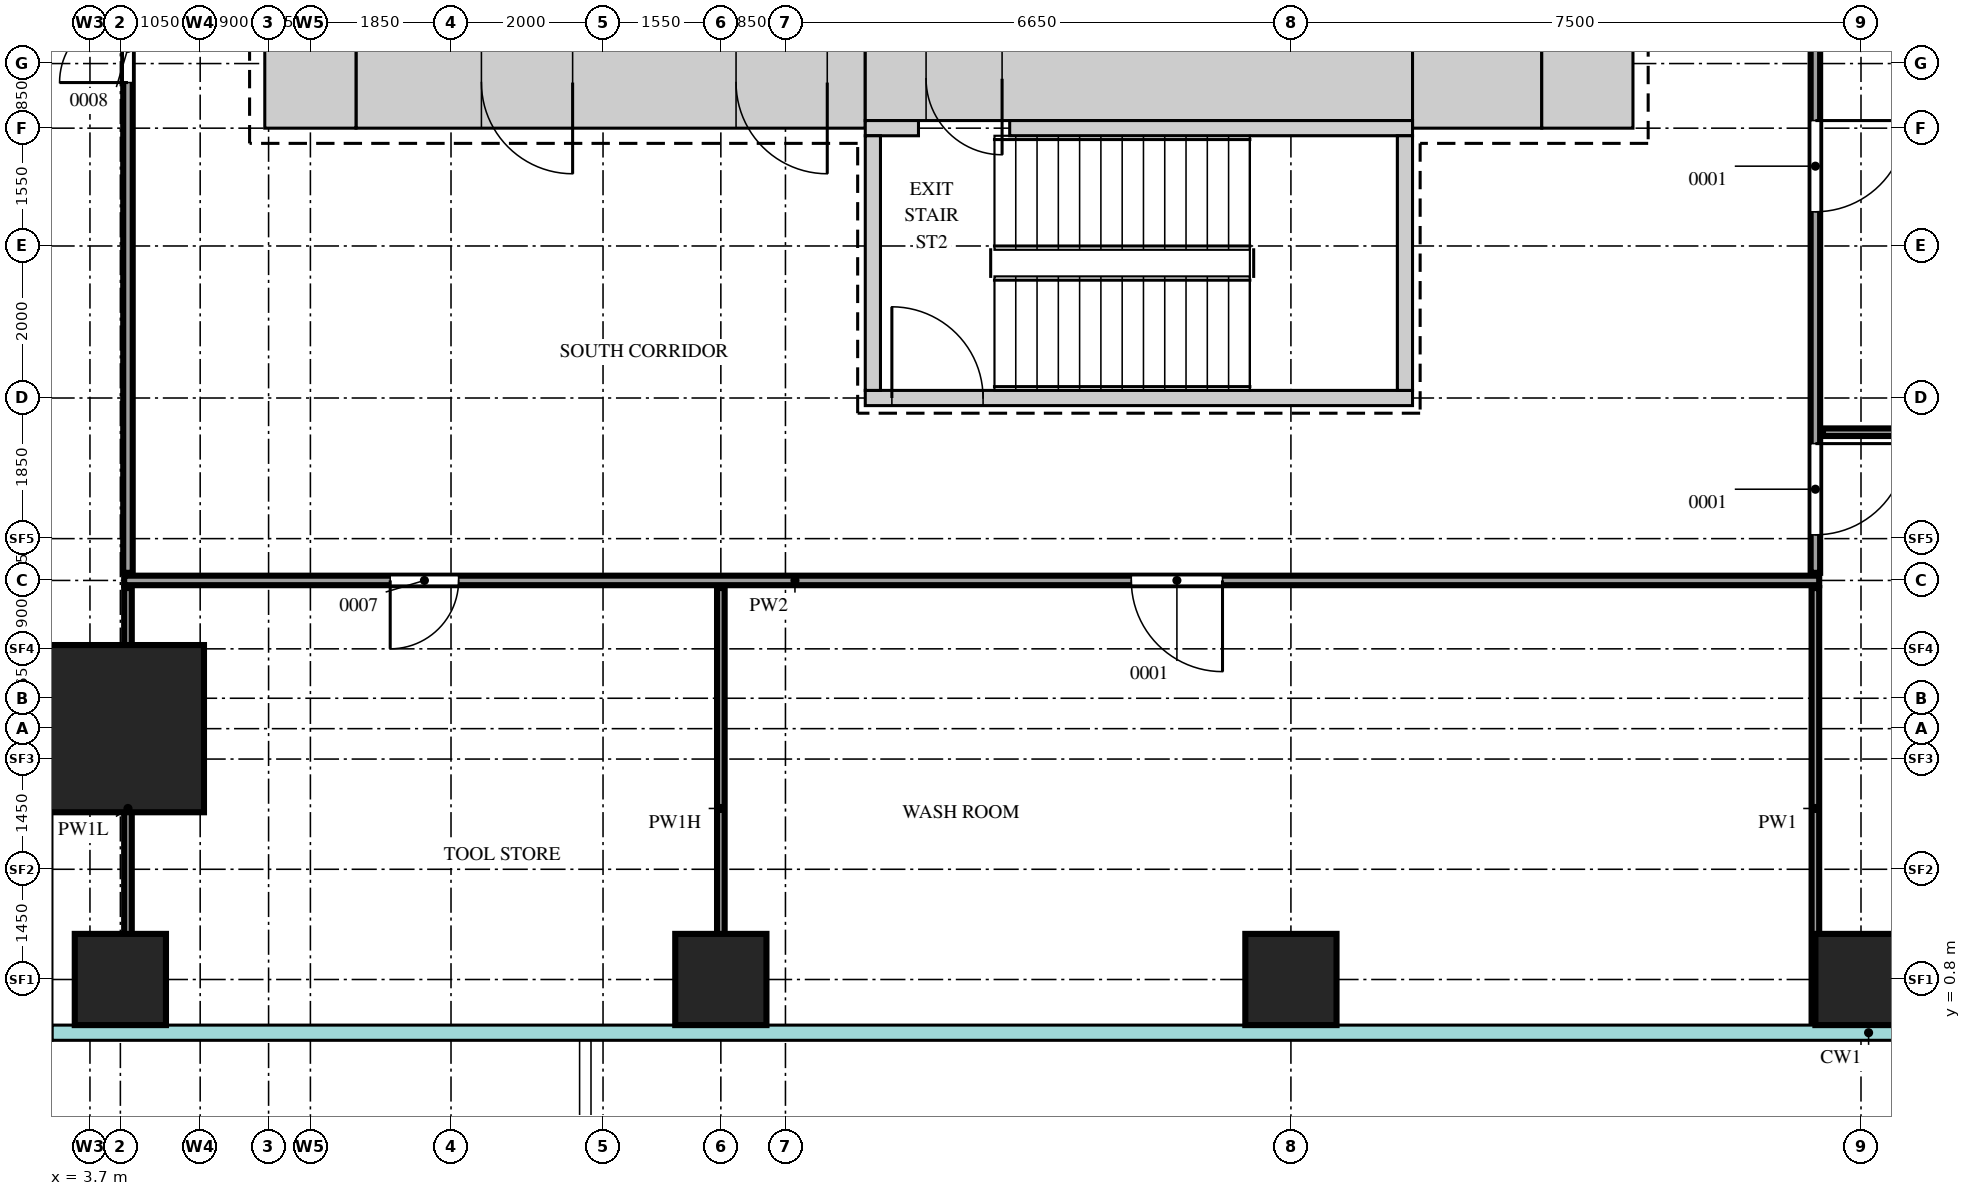
"""IFC4 building model, lengths in metres.
Left out: names, types, materials, properties, quantities, classifications, styles, units other than length and angle.
Written with IfcOpenShell. Run it as: python <this file> out.ifc"""

import sys

from ifc_helpers import new_model, si_unit, direction, frame, frame_2d, origin, origin_2d, place, context, subcontext, project, spatial, rectangle, extrude, source, transform, mapped, element, fill, save


model = new_model("IFC4")
c1 = context("Model", 3, precision=1e-05, world=origin(), true_north=direction((0.0, 1.0)))
c2 = subcontext(c1, "Body", "Model", "MODEL_VIEW")
j1 = project(units=[si_unit("LENGTHUNIT", "METRE"), si_unit("PLANEANGLEUNIT", "RADIAN")], contexts=[c1])
p1 = place(None, origin())
s1 = spatial("IfcSite", under=j1, at=p1, CompositionType="ELEMENT")
p2 = place(p1, origin())
s2 = spatial("IfcBuilding", under=s1, at=p2, CompositionType="ELEMENT")
p3 = place(p2, frame((0.0, 0.0, 64.5)))
s3 = spatial("IfcBuildingStorey", under=s2, at=p3, CompositionType="ELEMENT", Elevation=64.5)
m1 = source(origin(), c2, "Body", "SweptSolid", [
    extrude(rectangle(XDim=6.7, YDim=1.2, at=frame_2d((3.35, 0.0))), origin(), (0.0, 0.0, 1.0), 4.2),
])
p4 = place(p3, frame((7.2, 12.6, 0.0), z_axis=(0.0, 0.0, 1.0), x_axis=(1.0, 0.0, 0.0)))
e1 = element("IfcWall", 1, at=p4, inside=s3, PredefinedType="SHEAR", context=c2, shape_type="MappedRepresentation", body=[
    mapped(m1, transform((0.0, 0.0, 0.0))),
])
m2 = source(origin(), c2, "Body", "SweptSolid", [
    extrude(rectangle(XDim=1.2, YDim=2.1, at=frame_2d((0.6, 1.05))), frame((0.0, 0.61, 0.0), z_axis=(0.0, -1.0, 0.0), x_axis=(1.0, 0.0, 0.0)), (0.0, 0.0, 1.0), 1.22),
])
p5 = place(p4, frame((5.0, 0.0, 0.0)))
e2 = element("IfcOpeningElement", 2, at=p5, cuts=e1, PredefinedType="OPENING", context=c2, shape_type="MappedRepresentation", body=[
    mapped(m2, transform((0.0, 0.0, 0.0))),
])
p6 = place(p4, frame((1.65, 0.0, 0.0)))
e3 = element("IfcOpeningElement", 3, at=p6, cuts=e1, PredefinedType="OPENING", context=c2, shape_type="MappedRepresentation", body=[
    mapped(m2, transform((0.0, 0.0, 0.0))),
])
m3 = source(origin(), c2, "Body", "SweptSolid", [
    extrude(rectangle(XDim=7.2, YDim=1.1, at=frame_2d((3.6, 0.0))), origin(), (0.0, 0.0, 1.0), 4.2),
])
p7 = place(p3, frame((13.9, 12.65, 0.0), z_axis=(0.0, 0.0, 1.0), x_axis=(1.0, 0.0, 0.0)))
e4 = element("IfcWall", 4, at=p7, inside=s3, PredefinedType="SHEAR", context=c2, shape_type="MappedRepresentation", body=[
    mapped(m3, transform((0.0, 0.0, 0.0))),
])
m4 = source(origin(), c2, "Body", "SweptSolid", [
    extrude(rectangle(XDim=1.0, YDim=2.1, at=frame_2d((0.5, 1.05))), frame((0.0, 0.56, 0.0), z_axis=(0.0, -1.0, 0.0), x_axis=(1.0, 0.0, 0.0)), (0.0, 0.0, 1.0), 1.12),
])
p8 = place(p7, frame((0.8, 0.0, 0.0)))
e5 = element("IfcOpeningElement", 5, at=p8, cuts=e4, PredefinedType="OPENING", context=c2, shape_type="MappedRepresentation", body=[
    mapped(m4, transform((0.0, 0.0, 0.0))),
])
m5 = source(origin(), c2, "Body", "SweptSolid", [
    extrude(rectangle(XDim=1.7, YDim=1.2, at=frame_2d((0.85, 0.0))), origin(), (0.0, 0.0, 1.0), 4.2),
])
p9 = place(p3, frame((21.1, 12.6, 0.0), z_axis=(0.0, 0.0, 1.0), x_axis=(1.0, 0.0, 0.0)))
e6 = element("IfcWall", 6, at=p9, inside=s3, PredefinedType="SHEAR", context=c2, shape_type="MappedRepresentation", body=[
    mapped(m5, transform((0.0, 0.0, 0.0))),
])
m6 = source(origin(), c2, "Body", "SweptSolid", [
    extrude(rectangle(XDim=1.2, YDim=1.2, at=frame_2d((0.6, 0.0))), origin(), (0.0, 0.0, 1.0), 4.2),
])
for number, where, z_axis, x_axis in (
    (7, (22.8, 12.6, 0.0), (0.0, 0.0, 1.0), (1.0, 0.0, 0.0)),
    (8, (6.0, 12.6, 0.0), (0.0, 0.0, 1.0), (1.0, 0.0, 0.0)),
):
    element("IfcWall", number, at=place(p3, frame(where, z_axis=z_axis, x_axis=x_axis)), inside=s3, PredefinedType="SHEAR", context=c2, shape_type="MappedRepresentation", body=[
        mapped(m6, transform((0.0, 0.0, 0.0))),
    ])
m7 = source(origin(), c2, "Body", "SweptSolid", [
    extrude(rectangle(XDim=0.7, YDim=0.2, at=frame_2d((0.35, 0.0))), origin(), (0.0, 0.0, 1.0), 4.2),
])
p10 = place(p3, frame((13.9, 12.0, 0.0), z_axis=(0.0, 0.0, 1.0), x_axis=(1.0, 0.0, 0.0)))
e9 = element("IfcWall", 9, at=p10, inside=s3, PredefinedType="SHEAR", context=c2, shape_type="MappedRepresentation", body=[
    mapped(m7, transform((0.0, 0.0, 0.0))),
])
m8 = source(origin(), c2, "Body", "SweptSolid", [
    extrude(rectangle(XDim=5.3, YDim=0.2, at=frame_2d((2.65, 0.0))), origin(), (0.0, 0.0, 1.0), 4.2),
])
p11 = place(p3, frame((15.8, 12.0, 0.0), z_axis=(0.0, 0.0, 1.0), x_axis=(1.0, 0.0, 0.0)))
e10 = element("IfcWall", 10, at=p11, inside=s3, PredefinedType="SHEAR", context=c2, shape_type="MappedRepresentation", body=[
    mapped(m8, transform((0.0, 0.0, 0.0))),
])
m9 = source(origin(), c2, "Body", "SweptSolid", [
    extrude(rectangle(XDim=7.2, YDim=0.2, at=frame_2d((3.6, 0.0))), origin(), (0.0, 0.0, 1.0), 4.2),
])
p12 = place(p3, frame((13.9, 8.45, 0.0), z_axis=(0.0, 0.0, 1.0), x_axis=(1.0, 0.0, 0.0)))
e11 = element("IfcWall", 11, at=p12, inside=s3, PredefinedType="SHEAR", context=c2, shape_type="MappedRepresentation", body=[
    mapped(m9, transform((0.0, 0.0, 0.0))),
])
m10 = source(origin(), c2, "Body", "SweptSolid", [
    extrude(rectangle(XDim=1.2, YDim=2.1, at=frame_2d((0.6, 1.05))), frame((0.0, 0.11, 0.0), z_axis=(0.0, -1.0, 0.0), x_axis=(1.0, 0.0, 0.0)), (0.0, 0.0, 1.0), 0.22),
])
p13 = place(p12, frame((0.35, 0.0, 0.0)))
e12 = element("IfcOpeningElement", 12, at=p13, cuts=e11, PredefinedType="OPENING", context=c2, shape_type="MappedRepresentation", body=[
    mapped(m10, transform((0.0, 0.0, 0.0))),
])
m11 = source(origin(), c2, "Body", "SweptSolid", [
    extrude(rectangle(XDim=3.35, YDim=0.2, at=frame_2d((1.675, 0.0))), origin(), (0.0, 0.0, 1.0), 4.2),
])
for number, where, z_axis, x_axis in (
    (13, (21.0, 8.55, 0.0), (0.0, 0.0, 1.0), (0.0, 1.0, 0.0)),
    (14, (14.0, 8.55, 0.0), (0.0, 0.0, 1.0), (0.0, 1.0, 0.0)),
):
    element("IfcWall", number, at=place(p3, frame(where, z_axis=z_axis, x_axis=x_axis)), inside=s3, PredefinedType="SHEAR", context=c2, shape_type="MappedRepresentation", body=[
        mapped(m11, transform((0.0, 0.0, 0.0))),
    ])
m12 = source(origin(), c2, "Body", "SweptSolid", [
    extrude(rectangle(XDim=2.2, YDim=2.2, at=origin_2d()), origin(), (0.0, 0.0, 1.0), 4.5),
])
p14 = place(p3, frame((4.1, 4.1, 0.0), z_axis=(0.0, 0.0, 1.0), x_axis=(1.0, 0.0, 0.0)))
e15 = element("IfcColumn", 15, at=p14, inside=s3, PredefinedType="COLUMN", context=c2, shape_type="MappedRepresentation", body=[
    mapped(m12, transform((0.0, 0.0, 0.0))),
])
m13 = source(origin(), c2, "Body", "SweptSolid", [
    extrude(rectangle(XDim=1.2, YDim=1.2, at=origin_2d()), origin(), (0.0, 0.0, 1.0), 4.2),
])
for number, where, z_axis, x_axis in (
    (16, (4.1, 0.8, 0.0), (0.0, 0.0, 1.0), (1.0, 0.0, 0.0)),
    (17, (12.0, 0.8, 0.0), (0.0, 0.0, 1.0), (1.0, 0.0, 0.0)),
    (18, (19.5, 0.8, 0.0), (0.0, 0.0, 1.0), (1.0, 0.0, 0.0)),
    (19, (27.0, 0.8, 0.0), (0.0, 0.0, 1.0), (1.0, 0.0, 0.0)),
):
    element("IfcColumn", number, at=place(p3, frame(where, z_axis=z_axis, x_axis=x_axis)), inside=s3, PredefinedType="COLUMN", context=c2, shape_type="MappedRepresentation", body=[
        mapped(m13, transform((0.0, 0.0, 0.0))),
    ])
m14 = source(origin(), c2, "Body", "SweptSolid", [
    extrude(rectangle(XDim=5.8, YDim=0.1, at=frame_2d((2.9, 0.0))), origin(), (0.0, 0.0, 1.0), 3.6),
])
p15 = place(p3, frame((4.2, 0.15, 0.0), z_axis=(0.0, 0.0, 1.0), x_axis=(0.0, 1.0, 0.0)))
e20 = element("IfcWall", 20, at=p15, inside=s3, PredefinedType="PARTITIONING", context=c2, shape_type="MappedRepresentation", body=[
    mapped(m14, transform((0.0, 0.0, 0.0))),
])
m15 = source(origin(), c2, "Body", "SweptSolid", [
    extrude(rectangle(XDim=5.8, YDim=0.1, at=frame_2d((2.9, 0.0))), origin(), (0.0, 0.0, 1.0), 3.7),
])
p16 = place(p3, frame((12.0, 0.15, 0.0), z_axis=(0.0, 0.0, 1.0), x_axis=(0.0, 1.0, 0.0)))
e21 = element("IfcWall", 21, at=p16, inside=s3, PredefinedType="PARTITIONING", context=c2, shape_type="MappedRepresentation", body=[
    mapped(m15, transform((0.0, 0.0, 0.0))),
])
m16 = source(origin(), c2, "Body", "SweptSolid", [
    extrude(rectangle(XDim=5.8, YDim=0.1, at=frame_2d((2.9, 0.0))), origin(), (0.0, 0.0, 1.0), 4.3),
])
p17 = place(p3, frame((26.4, 0.15, 0.0), z_axis=(0.0, 0.0, 1.0), x_axis=(0.0, 1.0, 0.0)))
e22 = element("IfcWall", 22, at=p17, inside=s3, PredefinedType="PARTITIONING", context=c2, shape_type="MappedRepresentation", body=[
    mapped(m16, transform((0.0, 0.0, 0.0))),
])
m17 = source(origin(), c2, "Body", "SweptSolid", [
    extrude(rectangle(XDim=22.3, YDim=0.125, at=frame_2d((11.15, 0.0))), origin(), (0.0, 0.0, 1.0), 4.3),
])
p18 = place(p3, frame((4.15, 6.05, 0.0), z_axis=(0.0, 0.0, 1.0), x_axis=(1.0, 0.0, 0.0)))
e23 = element("IfcWall", 23, at=p18, inside=s3, PredefinedType="PARTITIONING", context=c2, shape_type="MappedRepresentation", body=[
    mapped(m17, transform((0.0, 0.0, 0.0))),
])
m18 = source(origin(), c2, "Body", "SweptSolid", [
    extrude(rectangle(XDim=0.9, YDim=2.1, at=frame_2d((0.45, 1.05))), frame((0.0, 0.073, 0.0), z_axis=(0.0, -1.0, 0.0), x_axis=(1.0, 0.0, 0.0)), (0.0, 0.0, 1.0), 0.145),
])
p19 = place(p18, frame((3.5, 0.0, 0.0)))
e24 = element("IfcOpeningElement", 24, at=p19, cuts=e23, PredefinedType="OPENING", context=c2, shape_type="MappedRepresentation", body=[
    mapped(m18, transform((0.0, 0.0, 0.0))),
])
m19 = source(origin(), c2, "Body", "SweptSolid", [
    extrude(rectangle(XDim=1.2, YDim=2.1, at=frame_2d((0.6, 1.05))), frame((0.0, 0.073, 0.0), z_axis=(0.0, -1.0, 0.0), x_axis=(1.0, 0.0, 0.0)), (0.0, 0.0, 1.0), 0.145),
])
p20 = place(p18, frame((13.25, 0.0, 0.0)))
e25 = element("IfcOpeningElement", 25, at=p20, cuts=e23, PredefinedType="OPENING", context=c2, shape_type="MappedRepresentation", body=[
    mapped(m19, transform((0.0, 0.0, 0.0))),
])
m20 = source(origin(), c2, "Body", "SweptSolid", [
    extrude(rectangle(XDim=41.8, YDim=0.125, at=frame_2d((20.9, 0.0))), origin(), (0.0, 0.0, 1.0), 4.3),
])
p21 = place(p3, frame((4.2, 6.15, 0.0), z_axis=(0.0, 0.0, 1.0), x_axis=(0.0, 1.0, 0.0)))
e26 = element("IfcWall", 26, at=p21, inside=s3, PredefinedType="PARTITIONING", context=c2, shape_type="MappedRepresentation", body=[
    mapped(m20, transform((0.0, 0.0, 0.0))),
])
p22 = place(p21, frame((6.45, 0.0, 0.0)))
e27 = element("IfcOpeningElement", 27, at=p22, cuts=e26, PredefinedType="OPENING", context=c2, shape_type="MappedRepresentation", body=[
    mapped(m18, transform((0.0, 0.0, 0.0))),
])
p23 = place(p21, frame((25.05, 0.0, 0.0)))
e28 = element("IfcOpeningElement", 28, at=p23, cuts=e26, PredefinedType="OPENING", context=c2, shape_type="MappedRepresentation", body=[
    mapped(m19, transform((0.0, 0.0, 0.0))),
])
m21 = source(origin(), c2, "Body", "SweptSolid", [
    extrude(rectangle(XDim=29.05, YDim=0.125, at=frame_2d((14.525, 0.0))), origin(), (0.0, 0.0, 1.0), 4.3),
])
p24 = place(p3, frame((26.4, 6.15, 0.0), z_axis=(0.0, 0.0, 1.0), x_axis=(0.0, 1.0, 0.0)))
e29 = element("IfcWall", 29, at=p24, inside=s3, PredefinedType="PARTITIONING", context=c2, shape_type="MappedRepresentation", body=[
    mapped(m21, transform((0.0, 0.0, 0.0))),
])
p25 = place(p24, frame((0.5, 0.0, 0.0)))
e30 = element("IfcOpeningElement", 30, at=p25, cuts=e29, PredefinedType="OPENING", context=c2, shape_type="MappedRepresentation", body=[
    mapped(m19, transform((0.0, 0.0, 0.0))),
])
p26 = place(p24, frame((4.75, 0.0, 0.0)))
e31 = element("IfcOpeningElement", 31, at=p26, cuts=e29, PredefinedType="OPENING", context=c2, shape_type="MappedRepresentation", body=[
    mapped(m19, transform((0.0, 0.0, 0.0))),
])
p27 = place(p24, frame((11.25, 0.0, 0.0)))
e32 = element("IfcOpeningElement", 32, at=p27, cuts=e29, PredefinedType="OPENING", context=c2, shape_type="MappedRepresentation", body=[
    mapped(m19, transform((0.0, 0.0, 0.0))),
])
p28 = place(p24, frame((17.5, 0.0, 0.0)))
e33 = element("IfcOpeningElement", 33, at=p28, cuts=e29, PredefinedType="OPENING", context=c2, shape_type="MappedRepresentation", body=[
    mapped(m19, transform((0.0, 0.0, 0.0))),
])
m22 = source(origin(), c2, "Body", "SweptSolid", [
    extrude(rectangle(XDim=27.35, YDim=0.1, at=frame_2d((13.675, 0.0))), origin(), (0.0, 0.0, 1.0), 4.3),
])
p29 = place(p3, frame((26.5, 8.0, 0.0), z_axis=(0.0, 0.0, 1.0), x_axis=(1.0, 0.0, 0.0)))
e34 = element("IfcWall", 34, at=p29, inside=s3, PredefinedType="PARTITIONING", context=c2, shape_type="MappedRepresentation", body=[
    mapped(m22, transform((0.0, 0.0, 0.0))),
])
m23 = source(origin(), c2, "Body", "SweptSolid", [
    extrude(rectangle(XDim=1.2, YDim=2.1, at=frame_2d((0.6, 1.05))), frame((0.0, 0.55, 0.0), z_axis=(0.0, -1.0, 0.0), x_axis=(1.0, 0.0, 0.0)), (0.0, 0.0, 1.0), 1.1),
])
p30 = place(p5, origin())
e35 = element("IfcDoor", 35, at=p30, inside=s3, OperationType="SINGLE_SWING_RIGHT", PredefinedType="DOOR", context=c2, shape_type="MappedRepresentation", body=[
    mapped(m23, transform((0.0, 0.0, 0.0))),
])
fill(e2, e35)
p31 = place(p6, origin())
e36 = element("IfcDoor", 36, at=p31, inside=s3, OperationType="SINGLE_SWING_RIGHT", PredefinedType="DOOR", context=c2, shape_type="MappedRepresentation", body=[
    mapped(m23, transform((0.0, 0.0, 0.0))),
])
fill(e3, e36)
m24 = source(origin(), c2, "Body", "SweptSolid", [
    extrude(rectangle(XDim=1.0, YDim=2.1, at=frame_2d((0.5, 1.05))), frame((0.0, 0.5, 0.0), z_axis=(0.0, -1.0, 0.0), x_axis=(1.0, 0.0, 0.0)), (0.0, 0.0, 1.0), 1.0),
])
p32 = place(p8, origin())
e37 = element("IfcDoor", 37, at=p32, inside=s3, OperationType="SINGLE_SWING_RIGHT", PredefinedType="DOOR", context=c2, shape_type="MappedRepresentation", body=[
    mapped(m24, transform((0.0, 0.0, 0.0))),
])
fill(e5, e37)
m25 = source(origin(), c2, "Body", "SweptSolid", [
    extrude(rectangle(XDim=1.2, YDim=2.1, at=frame_2d((0.6, 1.05))), frame((0.0, 0.025, 0.0), z_axis=(0.0, -1.0, 0.0), x_axis=(1.0, 0.0, 0.0)), (0.0, 0.0, 1.0), 0.05),
])
p33 = place(p25, origin())
e38 = element("IfcDoor", 38, at=p33, inside=s3, OperationType="SINGLE_SWING_RIGHT", PredefinedType="DOOR", context=c2, shape_type="MappedRepresentation", body=[
    mapped(m25, transform((0.0, 0.0, 0.0))),
])
fill(e30, e38)
p34 = place(p26, origin())
e39 = element("IfcDoor", 39, at=p34, inside=s3, OperationType="SINGLE_SWING_RIGHT", PredefinedType="DOOR", context=c2, shape_type="MappedRepresentation", body=[
    mapped(m25, transform((0.0, 0.0, 0.0))),
])
fill(e31, e39)
m26 = source(origin(), c2, "Body", "SweptSolid", [
    extrude(rectangle(XDim=0.9, YDim=2.1, at=frame_2d((0.45, 1.05))), frame((0.0, 0.025, 0.0), z_axis=(0.0, -1.0, 0.0), x_axis=(1.0, 0.0, 0.0)), (0.0, 0.0, 1.0), 0.05),
])
p35 = place(p22, origin())
e40 = element("IfcDoor", 40, at=p35, inside=s3, OperationType="SINGLE_SWING_RIGHT", PredefinedType="DOOR", context=c2, shape_type="MappedRepresentation", body=[
    mapped(m26, transform((0.0, 0.0, 0.0))),
])
fill(e27, e40)
p36 = place(p19, origin())
e41 = element("IfcDoor", 41, at=p36, inside=s3, OperationType="SINGLE_SWING_LEFT", PredefinedType="DOOR", context=c2, shape_type="MappedRepresentation", body=[
    mapped(m26, transform((0.0, 0.0, 0.0))),
])
fill(e24, e41)
p37 = place(p20, origin())
e42 = element("IfcDoor", 42, at=p37, inside=s3, OperationType="SINGLE_SWING_RIGHT", PredefinedType="DOOR", context=c2, shape_type="MappedRepresentation", body=[
    mapped(m25, transform((0.0, 0.0, 0.0))),
])
fill(e25, e42)
p38 = place(p13, origin())
e43 = element("IfcDoor", 43, at=p38, inside=s3, OperationType="SINGLE_SWING_RIGHT", PredefinedType="DOOR", context=c2, shape_type="MappedRepresentation", body=[
    mapped(m25, transform((0.0, 0.0, 0.0))),
])
fill(e12, e43)
save(model, sys.argv[1])
